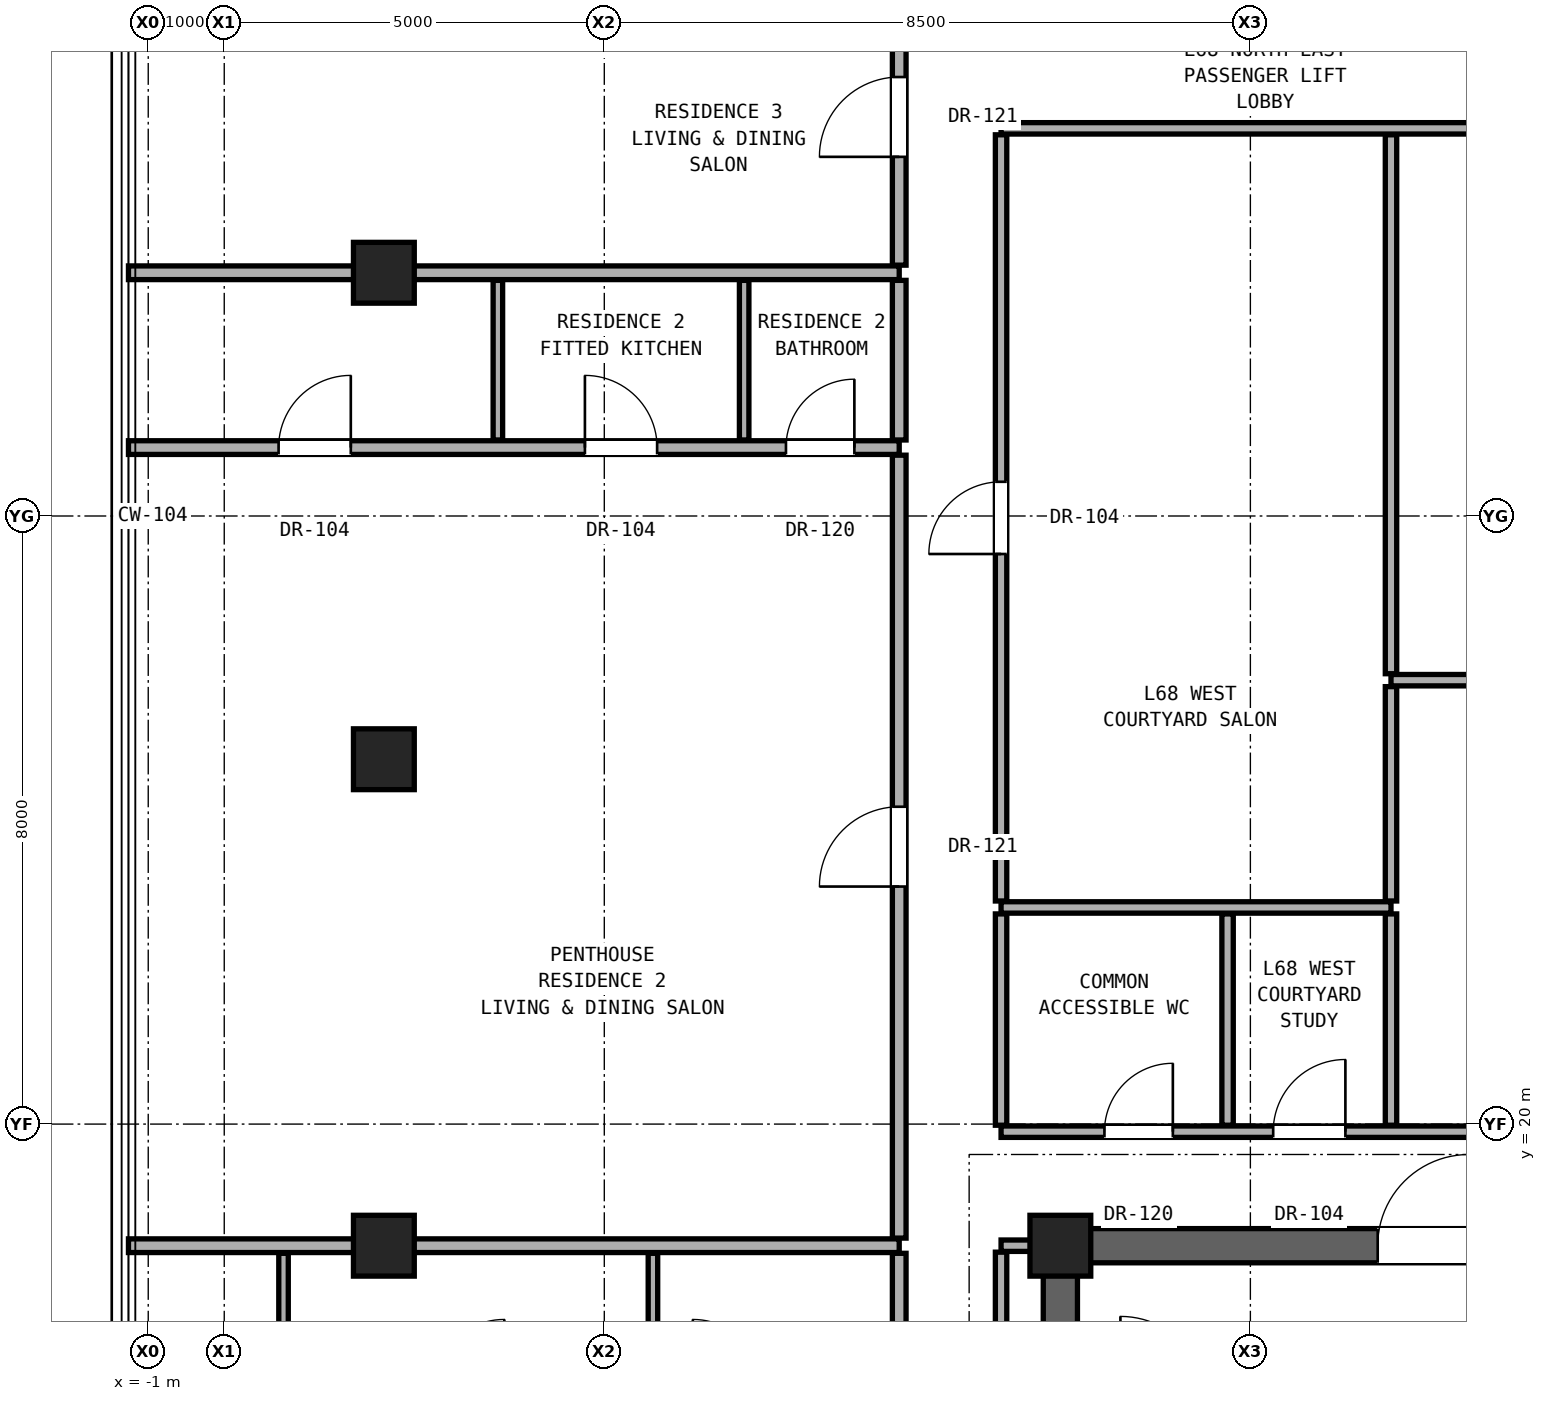
"""IFC4 building model, lengths in metres.
Left out: names, types, materials, properties, quantities, classifications, styles, units other than length and angle.
Written with IfcOpenShell. Run it as: python <this file> out.ifc"""

import sys

from ifc_helpers import new_model, si_unit, direction, frame, frame_2d, origin, origin_2d, place, context, subcontext, project, spatial, rectangle, hollow_rectangle, extrude, element, fill, save


model = new_model("IFC4")
c1 = context("Model", 3, precision=1e-05, world=origin(), true_north=direction((0.0, 1.0)))
c2 = subcontext(c1, "Body", "Model", "MODEL_VIEW")
j1 = project(units=[si_unit("LENGTHUNIT", "METRE"), si_unit("PLANEANGLEUNIT", "RADIAN")], contexts=[c1])
p1 = place(None, origin())
s1 = spatial("IfcSite", under=j1, at=p1, CompositionType="ELEMENT")
p2 = place(p1, origin())
s2 = spatial("IfcBuilding", under=s1, at=p2, CompositionType="ELEMENT")
p3 = place(p2, frame((0.0, 0.0, 239.2)))
s3 = spatial("IfcBuildingStorey", under=s2, at=p3, CompositionType="ELEMENT", Elevation=239.2)
p4 = place(p3, frame((11.0, 18.4, 0.0), z_axis=(0.0, 0.0, 1.0), x_axis=(1.0, 0.0, 0.0)))
e1 = element("IfcColumn", 1, at=p4, inside=s3, PredefinedType="COLUMN", context=c2, shape_type="SweptSolid", body=[
    extrude(rectangle(XDim=0.8, YDim=0.8, at=origin_2d()), origin(), (0.0, 0.0, 1.0), 3.3),
])
for number, where, z_axis, x_axis in (
    (2, (2.1, 18.4, 0.0), (0.0, 0.0, 1.0), (1.0, 0.0, 0.0)),
    (3, (2.1, 24.8, 0.0), (0.0, 0.0, 1.0), (1.0, 0.0, 0.0)),
    (4, (2.1, 31.2, 0.0), (0.0, 0.0, 1.0), (1.0, 0.0, 0.0)),
):
    element("IfcColumn", number, at=place(p3, frame(where, z_axis=z_axis, x_axis=x_axis)), inside=s3, PredefinedType="COLUMN", context=c2, shape_type="SweptSolid", body=[
        extrude(hollow_rectangle(XDim=0.8, YDim=0.8, WallThickness=0.045, at=origin_2d()), origin(), (0.0, 0.0, 1.0), 3.3),
    ])
p5 = place(p3, frame((11.0, 12.4, 0.0), z_axis=(0.0, 0.0, 1.0), x_axis=(0.0, 1.0, 0.0)))
e5 = element("IfcWall", 5, at=p5, inside=s3, PredefinedType="SHEAR", context=c2, shape_type="SweptSolid", body=[
    extrude(rectangle(XDim=6.0, YDim=0.45, at=frame_2d((3.0, 0.0))), origin(), (0.0, 0.0, 1.0), 3.1),
])
p6 = place(p3, frame((11.0, 18.4, 0.0), z_axis=(0.0, 0.0, 1.0), x_axis=(1.0, 0.0, 0.0)))
e6 = element("IfcWall", 6, at=p6, inside=s3, PredefinedType="SHEAR", context=c2, shape_type="SweptSolid", body=[
    extrude(rectangle(XDim=19.0, YDim=0.45, at=frame_2d((9.5, 0.0))), origin(), (0.0, 0.0, 1.0), 3.1),
])
p7 = place(p6, frame((4.175, 0.0, 0.0)))
e7 = element("IfcOpeningElement", 7, at=p7, cuts=e6, PredefinedType="OPENING", context=c2, shape_type="SweptSolid", body=[
    extrude(rectangle(XDim=1.2, YDim=2.25, at=frame_2d((0.6, 1.125))), frame((0.0, 0.235, 0.0), z_axis=(0.0, -1.0, 0.0), x_axis=(1.0, 0.0, 0.0)), (0.0, 0.0, 1.0), 0.47),
])
p8 = place(p6, frame((11.075, 0.0, 0.0)))
e8 = element("IfcOpeningElement", 8, at=p8, cuts=e6, PredefinedType="OPENING", context=c2, shape_type="SweptSolid", body=[
    extrude(rectangle(XDim=0.95, YDim=2.15, at=frame_2d((0.475, 1.075))), frame((0.0, 0.235, 0.0), z_axis=(0.0, -1.0, 0.0), x_axis=(1.0, 0.0, 0.0)), (0.0, 0.0, 1.0), 0.47),
])
p9 = place(p6, frame((14.3, 0.0, 0.0)))
e9 = element("IfcOpeningElement", 9, at=p9, cuts=e6, PredefinedType="OPENING", context=c2, shape_type="SweptSolid", body=[
    extrude(rectangle(XDim=1.3, YDim=2.3, at=frame_2d((0.65, 1.15))), frame((0.0, 0.235, 0.0), z_axis=(0.0, -1.0, 0.0), x_axis=(1.0, 0.0, 0.0)), (0.0, 0.0, 1.0), 0.47),
])
p10 = place(p6, frame((16.6, 0.0, 0.0)))
e10 = element("IfcOpeningElement", 10, at=p10, cuts=e6, PredefinedType="OPENING", context=c2, shape_type="SweptSolid", body=[
    extrude(rectangle(XDim=1.3, YDim=2.3, at=frame_2d((0.65, 1.15))), frame((0.0, 0.235, 0.0), z_axis=(0.0, -1.0, 0.0), x_axis=(1.0, 0.0, 0.0)), (0.0, 0.0, 1.0), 0.47),
])
p11 = place(p3, frame((-1.26, 18.4, 0.0), z_axis=(0.0, 0.0, 1.0), x_axis=(1.0, 0.0, 0.0)))
e11 = element("IfcWall", 11, at=p11, inside=s3, PredefinedType="PARTITIONING", context=c2, shape_type="SweptSolid", body=[
    extrude(rectangle(XDim=10.14, YDim=0.18, at=frame_2d((5.07, 0.0))), origin(), (0.0, 0.0, 1.0), 2.319),
])
p12 = place(p3, frame((10.22, 18.4, 0.0), z_axis=(0.0, 0.0, 1.0), x_axis=(1.0, 0.0, 0.0)))
e12 = element("IfcWall", 12, at=p12, inside=s3, PredefinedType="PARTITIONING", context=c2, shape_type="SweptSolid", body=[
    extrude(rectangle(XDim=0.56, YDim=0.15, at=frame_2d((0.28, 0.0))), origin(), (0.0, 0.0, 1.0), 2.492),
])
p13 = place(p3, frame((10.22, 19.9, 0.0), z_axis=(0.0, 0.0, 1.0), x_axis=(1.0, 0.0, 0.0)))
e13 = element("IfcWall", 13, at=p13, inside=s3, PredefinedType="PARTITIONING", context=c2, shape_type="SweptSolid", body=[
    extrude(rectangle(XDim=20.56, YDim=0.15, at=frame_2d((10.28, 0.0))), origin(), (0.0, 0.0, 1.0), 2.236),
])
p14 = place(p13, frame((1.36, 0.0, 0.0)))
e14 = element("IfcOpeningElement", 14, at=p14, cuts=e13, PredefinedType="OPENING", context=c2, shape_type="SweptSolid", body=[
    extrude(rectangle(XDim=0.9, YDim=2.1, at=frame_2d((0.45, 1.05))), frame((0.0, 0.085, 0.0), z_axis=(0.0, -1.0, 0.0), x_axis=(1.0, 0.0, 0.0)), (0.0, 0.0, 1.0), 0.17),
])
p15 = place(p13, frame((3.58, 0.0, 0.0)))
e15 = element("IfcOpeningElement", 15, at=p15, cuts=e13, PredefinedType="OPENING", context=c2, shape_type="SweptSolid", body=[
    extrude(rectangle(XDim=0.95, YDim=2.15, at=frame_2d((0.475, 1.075))), frame((0.0, 0.085, 0.0), z_axis=(0.0, -1.0, 0.0), x_axis=(1.0, 0.0, 0.0)), (0.0, 0.0, 1.0), 0.17),
])
p16 = place(p13, frame((8.926, 0.0, 0.0)))
e16 = element("IfcOpeningElement", 16, at=p16, cuts=e13, PredefinedType="OPENING", context=c2, shape_type="SweptSolid", body=[
    extrude(rectangle(XDim=1.05, YDim=2.2, at=frame_2d((0.525, 1.1))), frame((0.0, 0.085, 0.0), z_axis=(0.0, -1.0, 0.0), x_axis=(1.0, 0.0, 0.0)), (0.0, 0.0, 1.0), 0.17),
])
p17 = place(p13, frame((16.621, 0.0, 0.0)))
e17 = element("IfcOpeningElement", 17, at=p17, cuts=e13, PredefinedType="OPENING", context=c2, shape_type="SweptSolid", body=[
    extrude(rectangle(XDim=1.05, YDim=2.2, at=frame_2d((0.525, 1.1))), frame((0.0, 0.085, 0.0), z_axis=(0.0, -1.0, 0.0), x_axis=(1.0, 0.0, 0.0)), (0.0, 0.0, 1.0), 0.17),
])
p18 = place(p3, frame((10.22, 22.85, 0.0), z_axis=(0.0, 0.0, 1.0), x_axis=(1.0, 0.0, 0.0)))
e18 = element("IfcWall", 18, at=p18, inside=s3, PredefinedType="PARTITIONING", context=c2, shape_type="SweptSolid", body=[
    extrude(rectangle(XDim=5.13, YDim=0.15, at=frame_2d((2.565, 0.0))), origin(), (0.0, 0.0, 1.0), 2.236),
])
p19 = place(p3, frame((15.35, 25.84, 0.0), z_axis=(0.0, 0.0, 1.0), x_axis=(1.0, 0.0, 0.0)))
e19 = element("IfcWall", 19, at=p19, inside=s3, PredefinedType="PARTITIONING", context=c2, shape_type="SweptSolid", body=[
    extrude(rectangle(XDim=15.43, YDim=0.15, at=frame_2d((7.715, 0.0))), origin(), (0.0, 0.0, 1.0), 2.236),
])
p20 = place(p3, frame((-1.26, 28.9, 0.0), z_axis=(0.0, 0.0, 1.0), x_axis=(1.0, 0.0, 0.0)))
e20 = element("IfcWall", 20, at=p20, inside=s3, PredefinedType="PARTITIONING", context=c2, shape_type="SweptSolid", body=[
    extrude(rectangle(XDim=10.14, YDim=0.18, at=frame_2d((5.07, 0.0))), origin(), (0.0, 0.0, 1.0), 2.319),
])
p21 = place(p20, frame((1.975, 0.0, 0.0)))
e21 = element("IfcOpeningElement", 21, at=p21, cuts=e20, PredefinedType="OPENING", context=c2, shape_type="SweptSolid", body=[
    extrude(rectangle(XDim=0.95, YDim=2.15, at=frame_2d((0.475, 1.075))), frame((0.0, 0.1, 0.0), z_axis=(0.0, -1.0, 0.0), x_axis=(1.0, 0.0, 0.0)), (0.0, 0.0, 1.0), 0.2),
])
p22 = place(p20, frame((6.005, 0.0, 0.0)))
e22 = element("IfcOpeningElement", 22, at=p22, cuts=e20, PredefinedType="OPENING", context=c2, shape_type="SweptSolid", body=[
    extrude(rectangle(XDim=0.95, YDim=2.15, at=frame_2d((0.475, 1.075))), frame((0.0, 0.1, 0.0), z_axis=(0.0, -1.0, 0.0), x_axis=(1.0, 0.0, 0.0)), (0.0, 0.0, 1.0), 0.2),
])
p23 = place(p20, frame((8.65, 0.0, 0.0)))
e23 = element("IfcOpeningElement", 23, at=p23, cuts=e20, PredefinedType="OPENING", context=c2, shape_type="SweptSolid", body=[
    extrude(rectangle(XDim=0.9, YDim=2.1, at=frame_2d((0.45, 1.05))), frame((0.0, 0.1, 0.0), z_axis=(0.0, -1.0, 0.0), x_axis=(1.0, 0.0, 0.0)), (0.0, 0.0, 1.0), 0.2),
])
p24 = place(p3, frame((-1.26, 31.2, 0.0), z_axis=(0.0, 0.0, 1.0), x_axis=(1.0, 0.0, 0.0)))
e24 = element("IfcWall", 24, at=p24, inside=s3, PredefinedType="PARTITIONING", context=c2, shape_type="SweptSolid", body=[
    extrude(rectangle(XDim=10.14, YDim=0.18, at=frame_2d((5.07, 0.0))), origin(), (0.0, 0.0, 1.0), 2.319),
])
p25 = place(p3, frame((10.22, 33.1, 0.0), z_axis=(0.0, 0.0, 1.0), x_axis=(1.0, 0.0, 0.0)))
e25 = element("IfcWall", 25, at=p25, inside=s3, PredefinedType="PARTITIONING", context=c2, shape_type="SweptSolid", body=[
    extrude(rectangle(XDim=20.56, YDim=0.15, at=frame_2d((10.28, 0.0))), origin(), (0.0, 0.0, 1.0), 2.236),
])
p26 = place(p25, frame((8.926, 0.0, 0.0)))
e26 = element("IfcOpeningElement", 26, at=p26, cuts=e25, PredefinedType="OPENING", context=c2, shape_type="SweptSolid", body=[
    extrude(rectangle(XDim=1.05, YDim=2.2, at=frame_2d((0.525, 1.1))), frame((0.0, 0.085, 0.0), z_axis=(0.0, -1.0, 0.0), x_axis=(1.0, 0.0, 0.0)), (0.0, 0.0, 1.0), 0.17),
])
p27 = place(p25, frame((16.621, 0.0, 0.0)))
e27 = element("IfcOpeningElement", 27, at=p27, cuts=e25, PredefinedType="OPENING", context=c2, shape_type="SweptSolid", body=[
    extrude(rectangle(XDim=1.05, YDim=2.2, at=frame_2d((0.525, 1.1))), frame((0.0, 0.085, 0.0), z_axis=(0.0, -1.0, 0.0), x_axis=(1.0, 0.0, 0.0)), (0.0, 0.0, 1.0), 0.17),
])
p28 = place(p3, frame((0.78, 16.58, 0.0), z_axis=(0.0, 0.0, 1.0), x_axis=(0.0, 1.0, 0.0)))
e28 = element("IfcWall", 28, at=p28, inside=s3, PredefinedType="PARTITIONING", context=c2, shape_type="SweptSolid", body=[
    extrude(rectangle(XDim=1.72, YDim=0.125, at=frame_2d((0.86, 0.0))), origin(), (0.0, 0.0, 1.0), 3.1),
])
p29 = place(p3, frame((3.6, 29.0, 0.0), z_axis=(0.0, 0.0, 1.0), x_axis=(0.0, 1.0, 0.0)))
e29 = element("IfcWall", 29, at=p29, inside=s3, PredefinedType="PARTITIONING", context=c2, shape_type="SweptSolid", body=[
    extrude(rectangle(XDim=2.1, YDim=0.125, at=frame_2d((1.05, 0.0))), origin(), (0.0, 0.0, 1.0), 2.396),
])
p30 = place(p3, frame((5.64, 16.58, 0.0), z_axis=(0.0, 0.0, 1.0), x_axis=(0.0, 1.0, 0.0)))
e30 = element("IfcWall", 30, at=p30, inside=s3, PredefinedType="PARTITIONING", context=c2, shape_type="SweptSolid", body=[
    extrude(rectangle(XDim=1.72, YDim=0.125, at=frame_2d((0.86, 0.0))), origin(), (0.0, 0.0, 1.0), 2.492),
])
p31 = place(p3, frame((6.84, 29.0, 0.0), z_axis=(0.0, 0.0, 1.0), x_axis=(0.0, 1.0, 0.0)))
e31 = element("IfcWall", 31, at=p31, inside=s3, PredefinedType="PARTITIONING", context=c2, shape_type="SweptSolid", body=[
    extrude(rectangle(XDim=2.1, YDim=0.125, at=frame_2d((1.05, 0.0))), origin(), (0.0, 0.0, 1.0), 2.396),
])
p32 = place(p3, frame((8.88, 16.58, 0.0), z_axis=(0.0, 0.0, 1.0), x_axis=(0.0, 1.0, 0.0)))
e32 = element("IfcWall", 32, at=p32, inside=s3, PredefinedType="PARTITIONING", context=c2, shape_type="SweptSolid", body=[
    extrude(rectangle(XDim=1.72, YDim=0.18, at=frame_2d((0.86, 0.0))), origin(), (0.0, 0.0, 1.0), 2.492),
])
p33 = place(p3, frame((8.88, 18.5, 0.0), z_axis=(0.0, 0.0, 1.0), x_axis=(0.0, 1.0, 0.0)))
e33 = element("IfcWall", 33, at=p33, inside=s3, PredefinedType="PARTITIONING", context=c2, shape_type="SweptSolid", body=[
    extrude(rectangle(XDim=10.3, YDim=0.18, at=frame_2d((5.15, 0.0))), origin(), (0.0, 0.0, 1.0), 2.396),
])
p34 = place(p33, frame((4.625, 0.0, 0.0)))
e34 = element("IfcOpeningElement", 34, at=p34, cuts=e33, PredefinedType="OPENING", context=c2, shape_type="SweptSolid", body=[
    extrude(rectangle(XDim=1.05, YDim=2.2, at=frame_2d((0.525, 1.1))), frame((0.0, 0.1, 0.0), z_axis=(0.0, -1.0, 0.0), x_axis=(1.0, 0.0, 0.0)), (0.0, 0.0, 1.0), 0.2),
])
p35 = place(p3, frame((8.88, 29.0, 0.0), z_axis=(0.0, 0.0, 1.0), x_axis=(0.0, 1.0, 0.0)))
e35 = element("IfcWall", 35, at=p35, inside=s3, PredefinedType="PARTITIONING", context=c2, shape_type="SweptSolid", body=[
    extrude(rectangle(XDim=2.1, YDim=0.18, at=frame_2d((1.05, 0.0))), origin(), (0.0, 0.0, 1.0), 2.396),
])
p36 = place(p3, frame((8.88, 31.3, 0.0), z_axis=(0.0, 0.0, 1.0), x_axis=(0.0, 1.0, 0.0)))
e36 = element("IfcWall", 36, at=p36, inside=s3, PredefinedType="PARTITIONING", context=c2, shape_type="SweptSolid", body=[
    extrude(rectangle(XDim=3.9, YDim=0.18, at=frame_2d((1.95, 0.0))), origin(), (0.0, 0.0, 1.0), 2.396),
])
p37 = place(p36, frame((1.425, 0.0, 0.0)))
e37 = element("IfcOpeningElement", 37, at=p37, cuts=e36, PredefinedType="OPENING", context=c2, shape_type="SweptSolid", body=[
    extrude(rectangle(XDim=1.05, YDim=2.2, at=frame_2d((0.525, 1.1))), frame((0.0, 0.1, 0.0), z_axis=(0.0, -1.0, 0.0), x_axis=(1.0, 0.0, 0.0)), (0.0, 0.0, 1.0), 0.2),
])
p38 = place(p3, frame((10.22, 12.335, 0.0), z_axis=(0.0, 0.0, 1.0), x_axis=(0.0, 1.0, 0.0)))
e38 = element("IfcWall", 38, at=p38, inside=s3, PredefinedType="PARTITIONING", context=c2, shape_type="SweptSolid", body=[
    extrude(rectangle(XDim=5.98, YDim=0.15, at=frame_2d((2.99, 0.0))), origin(), (0.0, 0.0, 1.0), 2.492),
])
p39 = place(p3, frame((10.22, 19.985, 0.0), z_axis=(0.0, 0.0, 1.0), x_axis=(0.0, 1.0, 0.0)))
e39 = element("IfcWall", 39, at=p39, inside=s3, PredefinedType="PARTITIONING", context=c2, shape_type="SweptSolid", body=[
    extrude(rectangle(XDim=2.78, YDim=0.15, at=frame_2d((1.39, 0.0))), origin(), (0.0, 0.0, 1.0), 3.1),
])
p40 = place(p3, frame((10.22, 22.935, 0.0), z_axis=(0.0, 0.0, 1.0), x_axis=(0.0, 1.0, 0.0)))
e40 = element("IfcWall", 40, at=p40, inside=s3, PredefinedType="PARTITIONING", context=c2, shape_type="SweptSolid", body=[
    extrude(rectangle(XDim=10.08, YDim=0.15, at=frame_2d((5.04, 0.0))), origin(), (0.0, 0.0, 1.0), 2.396),
])
p41 = place(p40, frame((4.565, 0.0, 0.0)))
e41 = element("IfcOpeningElement", 41, at=p41, cuts=e40, PredefinedType="OPENING", context=c2, shape_type="SweptSolid", body=[
    extrude(rectangle(XDim=0.95, YDim=2.15, at=frame_2d((0.475, 1.075))), frame((0.0, 0.085, 0.0), z_axis=(0.0, -1.0, 0.0), x_axis=(1.0, 0.0, 0.0)), (0.0, 0.0, 1.0), 0.17),
])
for number, where, z_axis, x_axis in (
    (42, (13.2, 19.985, 0.0), (0.0, 0.0, 1.0), (0.0, 1.0, 0.0)),
    (43, (15.35, 19.985, 0.0), (0.0, 0.0, 1.0), (0.0, 1.0, 0.0)),
):
    element("IfcWall", number, at=place(p3, frame(where, z_axis=z_axis, x_axis=x_axis)), inside=s3, PredefinedType="PARTITIONING", context=c2, shape_type="SweptSolid", body=[
        extrude(rectangle(XDim=2.78, YDim=0.15, at=frame_2d((1.39, 0.0))), origin(), (0.0, 0.0, 1.0), 3.1),
    ])
p42 = place(p3, frame((15.35, 22.935, 0.0), z_axis=(0.0, 0.0, 1.0), x_axis=(0.0, 1.0, 0.0)))
e44 = element("IfcWall", 44, at=p42, inside=s3, PredefinedType="PARTITIONING", context=c2, shape_type="SweptSolid", body=[
    extrude(rectangle(XDim=2.82, YDim=0.15, at=frame_2d((1.41, 0.0))), origin(), (0.0, 0.0, 1.0), 2.236),
])
p43 = place(p3, frame((15.35, 25.925, 0.0), z_axis=(0.0, 0.0, 1.0), x_axis=(0.0, 1.0, 0.0)))
e45 = element("IfcWall", 45, at=p43, inside=s3, PredefinedType="PARTITIONING", context=c2, shape_type="SweptSolid", body=[
    extrude(rectangle(XDim=7.09, YDim=0.15, at=frame_2d((3.545, 0.0))), origin(), (0.0, 0.0, 1.0), 2.236),
])
p44 = place(p7, origin())
e46 = element("IfcDoor", 46, at=p44, inside=s3, OperationType="SINGLE_SWING_RIGHT", PredefinedType="DOOR", context=c2, shape_type="SweptSolid", body=[
    extrude(rectangle(XDim=1.2, YDim=2.25, at=frame_2d((0.6, 1.125))), frame((0.0, 0.025, 0.0), z_axis=(0.0, -1.0, 0.0), x_axis=(1.0, 0.0, 0.0)), (0.0, 0.0, 1.0), 0.05),
])
fill(e7, e46)
p45 = place(p14, origin())
e47 = element("IfcDoor", 47, at=p45, inside=s3, OperationType="SINGLE_SWING_RIGHT", PredefinedType="DOOR", context=c2, shape_type="SweptSolid", body=[
    extrude(rectangle(XDim=0.9, YDim=2.1, at=frame_2d((0.45, 1.05))), frame((0.0, 0.025, 0.0), z_axis=(0.0, -1.0, 0.0), x_axis=(1.0, 0.0, 0.0)), (0.0, 0.0, 1.0), 0.05),
])
fill(e14, e47)
p46 = place(p34, origin())
e48 = element("IfcDoor", 48, at=p46, inside=s3, OperationType="SINGLE_SWING_LEFT", PredefinedType="DOOR", context=c2, shape_type="SweptSolid", body=[
    extrude(rectangle(XDim=1.05, YDim=2.2, at=frame_2d((0.525, 1.1))), frame((0.0, 0.025, 0.0), z_axis=(0.0, -1.0, 0.0), x_axis=(1.0, 0.0, 0.0)), (0.0, 0.0, 1.0), 0.05),
])
fill(e34, e48)
p47 = place(p21, origin())
e49 = element("IfcDoor", 49, at=p47, inside=s3, OperationType="SINGLE_SWING_RIGHT", PredefinedType="DOOR", context=c2, shape_type="SweptSolid", body=[
    extrude(rectangle(XDim=0.95, YDim=2.15, at=frame_2d((0.475, 1.075))), frame((0.0, 0.025, 0.0), z_axis=(0.0, -1.0, 0.0), x_axis=(1.0, 0.0, 0.0)), (0.0, 0.0, 1.0), 0.05),
])
fill(e21, e49)
p48 = place(p22, origin())
e50 = element("IfcDoor", 50, at=p48, inside=s3, OperationType="SINGLE_SWING_LEFT", PredefinedType="DOOR", context=c2, shape_type="SweptSolid", body=[
    extrude(rectangle(XDim=0.95, YDim=2.15, at=frame_2d((0.475, 1.075))), frame((0.0, 0.025, 0.0), z_axis=(0.0, -1.0, 0.0), x_axis=(1.0, 0.0, 0.0)), (0.0, 0.0, 1.0), 0.05),
])
fill(e22, e50)
p49 = place(p23, origin())
e51 = element("IfcDoor", 51, at=p49, inside=s3, OperationType="SINGLE_SWING_RIGHT", PredefinedType="DOOR", context=c2, shape_type="SweptSolid", body=[
    extrude(rectangle(XDim=0.9, YDim=2.1, at=frame_2d((0.45, 1.05))), frame((0.0, 0.025, 0.0), z_axis=(0.0, -1.0, 0.0), x_axis=(1.0, 0.0, 0.0)), (0.0, 0.0, 1.0), 0.05),
])
fill(e23, e51)
p50 = place(p37, origin())
e52 = element("IfcDoor", 52, at=p50, inside=s3, OperationType="SINGLE_SWING_LEFT", PredefinedType="DOOR", context=c2, shape_type="SweptSolid", body=[
    extrude(rectangle(XDim=1.05, YDim=2.2, at=frame_2d((0.525, 1.1))), frame((0.0, 0.025, 0.0), z_axis=(0.0, -1.0, 0.0), x_axis=(1.0, 0.0, 0.0)), (0.0, 0.0, 1.0), 0.05),
])
fill(e37, e52)
p51 = place(p15, origin())
e53 = element("IfcDoor", 53, at=p51, inside=s3, OperationType="SINGLE_SWING_RIGHT", PredefinedType="DOOR", context=c2, shape_type="SweptSolid", body=[
    extrude(rectangle(XDim=0.95, YDim=2.15, at=frame_2d((0.475, 1.075))), frame((0.0, 0.025, 0.0), z_axis=(0.0, -1.0, 0.0), x_axis=(1.0, 0.0, 0.0)), (0.0, 0.0, 1.0), 0.05),
])
fill(e15, e53)
p52 = place(p41, origin())
e54 = element("IfcDoor", 54, at=p52, inside=s3, OperationType="SINGLE_SWING_LEFT", PredefinedType="DOOR", context=c2, shape_type="SweptSolid", body=[
    extrude(rectangle(XDim=0.95, YDim=2.15, at=frame_2d((0.475, 1.075))), frame((0.0, 0.025, 0.0), z_axis=(0.0, -1.0, 0.0), x_axis=(1.0, 0.0, 0.0)), (0.0, 0.0, 1.0), 0.05),
])
fill(e41, e54)
save(model, sys.argv[1])
